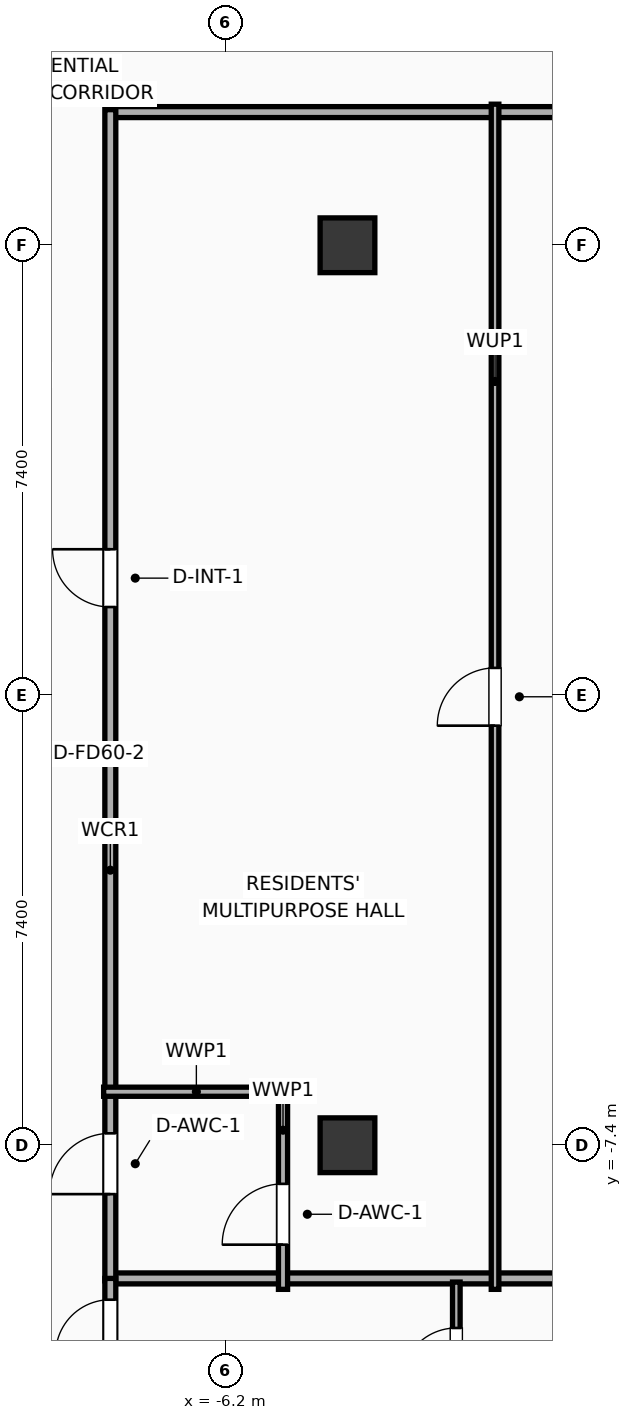
"""IFC4 building model, lengths in metres.
Left out: names, types, materials, properties, quantities, classifications, styles, units other than length and angle.
Written with IfcOpenShell. Run it as: python <this file> out.ifc"""

import sys

from ifc_helpers import new_model, si_unit, direction, frame, frame_2d, origin, origin_2d, place, context, subcontext, project, spatial, rectangle, extrude, element, fill, save


model = new_model("IFC4")
c1 = context("Model", 3, precision=1e-05, world=origin(), true_north=direction((0.0, 1.0)))
c2 = subcontext(c1, "Body", "Model", "MODEL_VIEW")
j1 = project(units=[si_unit("LENGTHUNIT", "METRE"), si_unit("PLANEANGLEUNIT", "RADIAN")], contexts=[c1])
p1 = place(None, origin())
s1 = spatial("IfcSite", under=j1, at=p1, CompositionType="ELEMENT")
p2 = place(p1, origin())
s2 = spatial("IfcBuilding", under=s1, at=p2, CompositionType="ELEMENT")
p3 = place(p2, frame((0.0, 0.0, 287.3)))
s3 = spatial("IfcBuildingStorey", under=s2, at=p3, CompositionType="ELEMENT", Elevation=287.3)
for number, where, z_axis, x_axis in (
    (1, (-4.2, -7.4, 0.0), (0.0, 0.0, 1.0), (1.0, 0.0, 0.0)),
    (2, (-4.2, 7.4, 0.0), (0.0, 0.0, 1.0), (1.0, 0.0, 0.0)),
):
    element("IfcColumn", number, at=place(p3, frame(where, z_axis=z_axis, x_axis=x_axis)), inside=s3, PredefinedType="COLUMN", context=c2, shape_type="SweptSolid", body=[
        extrude(rectangle(XDim=0.9, YDim=0.9, at=origin_2d()), origin(), (0.0, 0.0, 1.0), 3.9),
    ])
p4 = place(p3, frame((-8.15, 9.59, 0.0), z_axis=(0.0, 0.0, 1.0), x_axis=(1.0, 0.0, 0.0)))
e3 = element("IfcWall", 3, at=p4, inside=s3, PredefinedType="PARTITIONING", context=c2, shape_type="SweptSolid", body=[
    extrude(rectangle(XDim=16.3, YDim=0.18, at=frame_2d((8.15, 0.0))), origin(), (0.0, 0.0, 1.0), 3.635),
])
p5 = place(p4, frame((8.49, 0.0, 0.0)))
e4 = element("IfcOpeningElement", 4, at=p5, cuts=e3, PredefinedType="OPENING", context=c2, shape_type="SweptSolid", body=[
    extrude(rectangle(XDim=0.95, YDim=2.05, at=frame_2d((0.475, 1.025))), frame((0.0, 0.1, 0.0), z_axis=(0.0, -1.0, 0.0), x_axis=(1.0, 0.0, 0.0)), (0.0, 0.0, 1.0), 0.2),
])
p6 = place(p3, frame((-8.15, -9.59, 0.0), z_axis=(0.0, 0.0, 1.0), x_axis=(1.0, 0.0, 0.0)))
e5 = element("IfcWall", 5, at=p6, inside=s3, PredefinedType="PARTITIONING", context=c2, shape_type="SweptSolid", body=[
    extrude(rectangle(XDim=16.3, YDim=0.18, at=frame_2d((8.15, 0.0))), origin(), (0.0, 0.0, 1.0), 3.635),
])
p7 = place(p3, frame((-8.1, -9.63, 0.0), z_axis=(0.0, 0.0, 1.0), x_axis=(0.0, 1.0, 0.0)))
e6 = element("IfcWall", 6, at=p7, inside=s3, PredefinedType="PARTITIONING", context=c2, shape_type="SweptSolid", body=[
    extrude(rectangle(XDim=19.26, YDim=0.18, at=frame_2d((9.63, 0.0))), origin(), (0.0, 0.0, 1.0), 3.635),
])
p8 = place(p7, frame((1.426, 0.0, 0.0)))
e7 = element("IfcOpeningElement", 7, at=p8, cuts=e6, PredefinedType="OPENING", context=c2, shape_type="SweptSolid", body=[
    extrude(rectangle(XDim=1.0, YDim=2.05, at=frame_2d((0.5, 1.025))), frame((0.0, 0.1, 0.0), z_axis=(0.0, -1.0, 0.0), x_axis=(1.0, 0.0, 0.0)), (0.0, 0.0, 1.0), 0.2),
])
p9 = place(p7, frame((11.081, 0.0, 0.0)))
e8 = element("IfcOpeningElement", 8, at=p9, cuts=e6, PredefinedType="OPENING", context=c2, shape_type="SweptSolid", body=[
    extrude(rectangle(XDim=0.95, YDim=2.05, at=frame_2d((0.475, 1.025))), frame((0.0, 0.1, 0.0), z_axis=(0.0, -1.0, 0.0), x_axis=(1.0, 0.0, 0.0)), (0.0, 0.0, 1.0), 0.2),
])
p10 = place(p3, frame((-5.26, -9.77, 0.0), z_axis=(0.0, 0.0, 1.0), x_axis=(0.0, 1.0, 0.0)))
e9 = element("IfcWall", 9, at=p10, inside=s3, PredefinedType="PLUMBINGWALL", context=c2, shape_type="SweptSolid", body=[
    extrude(rectangle(XDim=3.35, YDim=0.15, at=frame_2d((1.675, 0.0))), origin(), (0.0, 0.0, 1.0), 3.635),
])
p11 = place(p10, frame((0.735, 0.0, 0.0)))
e10 = element("IfcOpeningElement", 10, at=p11, cuts=e9, PredefinedType="OPENING", context=c2, shape_type="SweptSolid", body=[
    extrude(rectangle(XDim=1.0, YDim=2.05, at=frame_2d((0.5, 1.025))), frame((0.0, 0.085, 0.0), z_axis=(0.0, -1.0, 0.0), x_axis=(1.0, 0.0, 0.0)), (0.0, 0.0, 1.0), 0.17),
])
p12 = place(p3, frame((-8.21, -6.52, 0.0), z_axis=(0.0, 0.0, 1.0), x_axis=(1.0, 0.0, 0.0)))
e11 = element("IfcWall", 11, at=p12, inside=s3, PredefinedType="PLUMBINGWALL", context=c2, shape_type="SweptSolid", body=[
    extrude(rectangle(XDim=3.05, YDim=0.15, at=frame_2d((1.525, 0.0))), origin(), (0.0, 0.0, 1.0), 3.635),
])
p13 = place(p3, frame((-1.773, -9.77, 0.0), z_axis=(0.0, 0.0, 1.0), x_axis=(0.0, 1.0, 0.0)))
e12 = element("IfcWall", 12, at=p13, inside=s3, PredefinedType="PARTITIONING", context=c2, shape_type="SweptSolid", body=[
    extrude(rectangle(XDim=19.49, YDim=0.125, at=frame_2d((9.745, 0.0))), origin(), (0.0, 0.0, 1.0), 3.635),
])
p14 = place(p13, frame((9.27, 0.0, 0.0)))
e13 = element("IfcOpeningElement", 13, at=p14, cuts=e12, PredefinedType="OPENING", context=c2, shape_type="SweptSolid", body=[
    extrude(rectangle(XDim=0.95, YDim=2.05, at=frame_2d((0.475, 1.025))), frame((0.0, 0.073, 0.0), z_axis=(0.0, -1.0, 0.0), x_axis=(1.0, 0.0, 0.0)), (0.0, 0.0, 1.0), 0.145),
])
p15 = place(p3, frame((-2.41, -12.06, 0.0), z_axis=(0.0, 0.0, 1.0), x_axis=(0.0, 1.0, 0.0)))
e14 = element("IfcWall", 14, at=p15, inside=s3, PredefinedType="PARTITIONING", context=c2, shape_type="SweptSolid", body=[
    extrude(rectangle(XDim=2.41, YDim=0.125, at=frame_2d((1.205, 0.0))), origin(), (0.0, 0.0, 1.0), 3.635),
])
p16 = place(p15, frame((0.755, 0.0, 0.0)))
e15 = element("IfcOpeningElement", 15, at=p16, cuts=e14, PredefinedType="OPENING", context=c2, shape_type="SweptSolid", body=[
    extrude(rectangle(XDim=0.9, YDim=2.05, at=frame_2d((0.45, 1.025))), frame((0.0, 0.073, 0.0), z_axis=(0.0, -1.0, 0.0), x_axis=(1.0, 0.0, 0.0)), (0.0, 0.0, 1.0), 0.145),
])
p17 = place(p3, frame((-8.1, -18.155, 0.0), z_axis=(0.0, 0.0, 1.0), x_axis=(0.0, 1.0, 0.0)))
e16 = element("IfcWall", 16, at=p17, inside=s3, PredefinedType="PARTITIONING", context=c2, shape_type="SweptSolid", body=[
    extrude(rectangle(XDim=8.564, YDim=0.18, at=frame_2d((4.282, 0.0))), origin(), (0.0, 0.0, 1.0), 3.635),
])
p18 = place(p17, frame((7.315, 0.0, 0.0)))
e17 = element("IfcOpeningElement", 17, at=p18, cuts=e16, PredefinedType="OPENING", context=c2, shape_type="SweptSolid", body=[
    extrude(rectangle(XDim=0.9, YDim=2.05, at=frame_2d((0.45, 1.025))), frame((0.0, 0.1, 0.0), z_axis=(0.0, -1.0, 0.0), x_axis=(1.0, 0.0, 0.0)), (0.0, 0.0, 1.0), 0.2),
])
p19 = place(p8, origin())
e18 = element("IfcDoor", 18, at=p19, inside=s3, OperationType="SINGLE_SWING_LEFT", PredefinedType="DOOR", context=c2, shape_type="SweptSolid", body=[
    extrude(rectangle(XDim=1.0, YDim=2.05, at=frame_2d((0.5, 1.025))), frame((0.0, 0.025, 0.0), z_axis=(0.0, -1.0, 0.0), x_axis=(1.0, 0.0, 0.0)), (0.0, 0.0, 1.0), 0.05),
])
fill(e7, e18)
p20 = place(p9, origin())
e19 = element("IfcDoor", 19, at=p20, inside=s3, OperationType="SINGLE_SWING_RIGHT", PredefinedType="DOOR", context=c2, shape_type="SweptSolid", body=[
    extrude(rectangle(XDim=0.95, YDim=2.05, at=frame_2d((0.475, 1.025))), frame((0.0, 0.025, 0.0), z_axis=(0.0, -1.0, 0.0), x_axis=(1.0, 0.0, 0.0)), (0.0, 0.0, 1.0), 0.05),
])
fill(e8, e19)
p21 = place(p11, origin())
e20 = element("IfcDoor", 20, at=p21, inside=s3, OperationType="SINGLE_SWING_LEFT", PredefinedType="DOOR", context=c2, shape_type="SweptSolid", body=[
    extrude(rectangle(XDim=1.0, YDim=2.05, at=frame_2d((0.5, 1.025))), frame((0.0, 0.025, 0.0), z_axis=(0.0, -1.0, 0.0), x_axis=(1.0, 0.0, 0.0)), (0.0, 0.0, 1.0), 0.05),
])
fill(e10, e20)
p22 = place(p14, origin())
e21 = element("IfcDoor", 21, at=p22, inside=s3, OperationType="SINGLE_SWING_LEFT", PredefinedType="DOOR", context=c2, shape_type="SweptSolid", body=[
    extrude(rectangle(XDim=0.95, YDim=2.05, at=frame_2d((0.475, 1.025))), frame((0.0, 0.025, 0.0), z_axis=(0.0, -1.0, 0.0), x_axis=(1.0, 0.0, 0.0)), (0.0, 0.0, 1.0), 0.05),
])
fill(e13, e21)
p23 = place(p16, origin())
e22 = element("IfcDoor", 22, at=p23, inside=s3, OperationType="SINGLE_SWING_LEFT", PredefinedType="DOOR", context=c2, shape_type="SweptSolid", body=[
    extrude(rectangle(XDim=0.9, YDim=2.05, at=frame_2d((0.45, 1.025))), frame((0.0, 0.025, 0.0), z_axis=(0.0, -1.0, 0.0), x_axis=(1.0, 0.0, 0.0)), (0.0, 0.0, 1.0), 0.05),
])
fill(e15, e22)
p24 = place(p18, origin())
e23 = element("IfcDoor", 23, at=p24, inside=s3, OperationType="SINGLE_SWING_LEFT", PredefinedType="DOOR", context=c2, shape_type="SweptSolid", body=[
    extrude(rectangle(XDim=0.9, YDim=2.05, at=frame_2d((0.45, 1.025))), frame((0.0, 0.025, 0.0), z_axis=(0.0, -1.0, 0.0), x_axis=(1.0, 0.0, 0.0)), (0.0, 0.0, 1.0), 0.05),
])
fill(e17, e23)
save(model, sys.argv[1])
